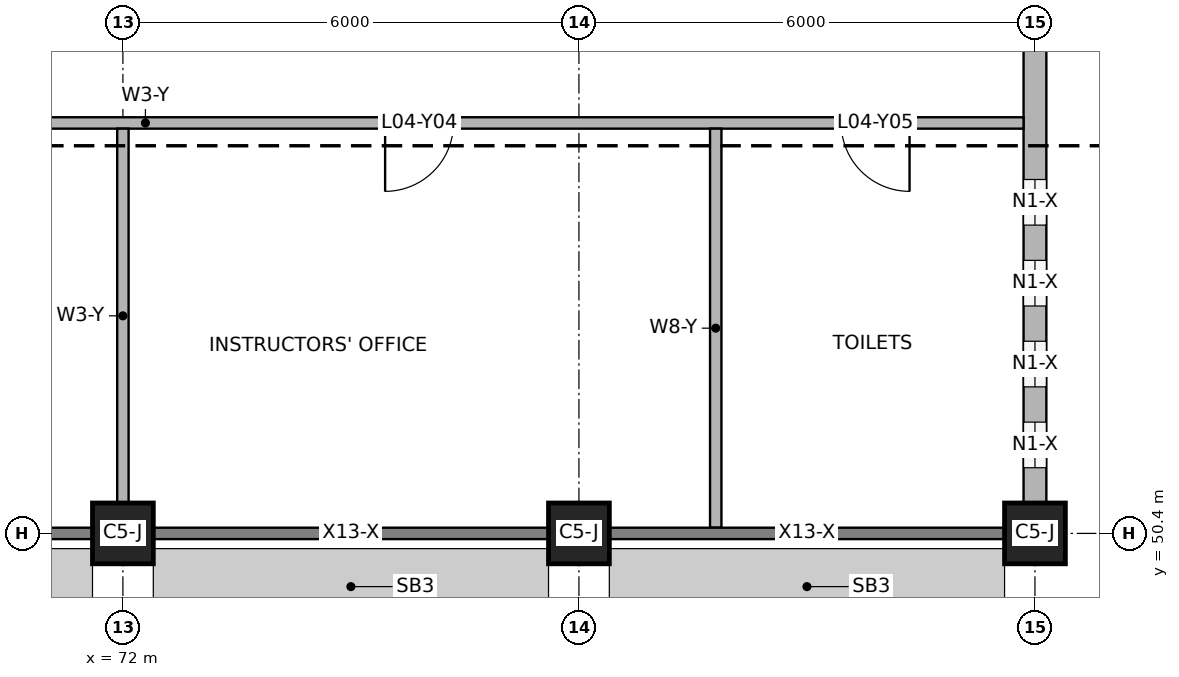
"""IFC4 building model, lengths in metres.
Left out: names, types, materials, properties, quantities, classifications, styles, units other than length and angle.
Written with IfcOpenShell. Run it as: python <this file> out.ifc"""

import sys

from ifc_helpers import new_model, si_unit, direction, frame, frame_2d, origin, origin_2d, place, context, subcontext, project, spatial, rectangle, extrude, element, fill, save


model = new_model("IFC4")
c1 = context("Model", 3, precision=1e-05, world=origin(), true_north=direction((0.0, 1.0)))
c2 = subcontext(c1, "Body", "Model", "MODEL_VIEW")
j1 = project(units=[si_unit("LENGTHUNIT", "METRE"), si_unit("PLANEANGLEUNIT", "RADIAN")], contexts=[c1])
p1 = place(None, origin())
s1 = spatial("IfcSite", under=j1, at=p1, CompositionType="ELEMENT")
p2 = place(p1, origin())
s2 = spatial("IfcBuilding", under=s1, at=p2, CompositionType="ELEMENT")
p3 = place(p2, frame((0.0, 0.0, 16.8)))
s3 = spatial("IfcBuildingStorey", under=s2, at=p3, CompositionType="ELEMENT", Elevation=16.8)
for number, where, z_axis, x_axis in (
    (1, (72.0, 50.4, 0.0), (0.0, 0.0, 1.0), (1.0, 0.0, 0.0)),
    (2, (78.0, 50.4, 0.0), (0.0, 0.0, 1.0), (1.0, 0.0, 0.0)),
    (3, (84.0, 50.4, 0.0), (0.0, 0.0, 1.0), (1.0, 0.0, 0.0)),
):
    element("IfcColumn", number, at=place(p3, frame(where, z_axis=z_axis, x_axis=x_axis)), inside=s3, PredefinedType="COLUMN", context=c2, shape_type="SweptSolid", body=[
        extrude(rectangle(XDim=0.8, YDim=0.8, at=origin_2d()), origin(), (0.0, 0.0, 1.0), 4.0),
    ])
p4 = place(p3, frame((84.0, 50.8, 0.0), z_axis=(0.0, 0.0, 1.0), x_axis=(0.0, 1.0, 0.0)))
e4 = element("IfcWall", 4, at=p4, inside=s3, PredefinedType="SOLIDWALL", context=c2, shape_type="SweptSolid", body=[
    extrude(rectangle(XDim=6.4, YDim=0.3, at=frame_2d((3.2, 0.0))), origin(), (0.0, 0.0, 1.0), 3.1),
])
p5 = place(p4, frame((0.464, 0.0, 0.9)))
e5 = element("IfcOpeningElement", 5, at=p5, cuts=e4, PredefinedType="OPENING", context=c2, shape_type="SweptSolid", body=[
    extrude(rectangle(XDim=0.6, YDim=1.9, at=frame_2d((0.3, 0.95))), frame((0.0, 0.16, 0.0), z_axis=(0.0, -1.0, 0.0), x_axis=(1.0, 0.0, 0.0)), (0.0, 0.0, 1.0), 0.32),
])
p6 = place(p4, frame((1.528, 0.0, 0.9)))
e6 = element("IfcOpeningElement", 6, at=p6, cuts=e4, PredefinedType="OPENING", context=c2, shape_type="SweptSolid", body=[
    extrude(rectangle(XDim=0.6, YDim=1.9, at=frame_2d((0.3, 0.95))), frame((0.0, 0.16, 0.0), z_axis=(0.0, -1.0, 0.0), x_axis=(1.0, 0.0, 0.0)), (0.0, 0.0, 1.0), 0.32),
])
p7 = place(p4, frame((2.592, 0.0, 0.9)))
e7 = element("IfcOpeningElement", 7, at=p7, cuts=e4, PredefinedType="OPENING", context=c2, shape_type="SweptSolid", body=[
    extrude(rectangle(XDim=0.6, YDim=1.9, at=frame_2d((0.3, 0.95))), frame((0.0, 0.16, 0.0), z_axis=(0.0, -1.0, 0.0), x_axis=(1.0, 0.0, 0.0)), (0.0, 0.0, 1.0), 0.32),
])
p8 = place(p4, frame((3.656, 0.0, 0.9)))
e8 = element("IfcOpeningElement", 8, at=p8, cuts=e4, PredefinedType="OPENING", context=c2, shape_type="SweptSolid", body=[
    extrude(rectangle(XDim=0.6, YDim=1.9, at=frame_2d((0.3, 0.95))), frame((0.0, 0.16, 0.0), z_axis=(0.0, -1.0, 0.0), x_axis=(1.0, 0.0, 0.0)), (0.0, 0.0, 1.0), 0.32),
])
p9 = place(p3, frame((72.0, 50.8, 0.0), z_axis=(0.0, 0.0, 1.0), x_axis=(0.0, 1.0, 0.0)))
e9 = element("IfcWall", 9, at=p9, inside=s3, PredefinedType="PARTITIONING", context=c2, shape_type="SweptSolid", body=[
    extrude(rectangle(XDim=4.925, YDim=0.15, at=frame_2d((2.462, 0.0))), origin(), (0.0, 0.0, 1.0), 3.1),
])
p10 = place(p3, frame((79.8, 50.475, 0.0), z_axis=(0.0, 0.0, 1.0), x_axis=(0.0, 1.0, 0.0)))
e10 = element("IfcWall", 10, at=p10, inside=s3, PredefinedType="PARTITIONING", context=c2, shape_type="SweptSolid", body=[
    extrude(rectangle(XDim=5.25, YDim=0.15, at=frame_2d((2.625, 0.0))), origin(), (0.0, 0.0, 1.0), 3.2),
])
p11 = place(p3, frame((66.075, 55.8, 0.0), z_axis=(0.0, 0.0, 1.0), x_axis=(1.0, 0.0, 0.0)))
e11 = element("IfcWall", 11, at=p11, inside=s3, PredefinedType="PARTITIONING", context=c2, shape_type="SweptSolid", body=[
    extrude(rectangle(XDim=17.775, YDim=0.15, at=frame_2d((8.888, 0.0))), origin(), (0.0, 0.0, 1.0), 3.1),
])
p12 = place(p11, frame((9.375, 0.0, 0.0)))
e12 = element("IfcOpeningElement", 12, at=p12, cuts=e11, PredefinedType="OPENING", context=c2, shape_type="SweptSolid", body=[
    extrude(rectangle(XDim=0.9, YDim=2.1, at=frame_2d((0.45, 1.05))), frame((0.0, 0.085, 0.0), z_axis=(0.0, -1.0, 0.0), x_axis=(1.0, 0.0, 0.0)), (0.0, 0.0, 1.0), 0.17),
])
p13 = place(p11, frame((15.375, 0.0, 0.0)))
e13 = element("IfcOpeningElement", 13, at=p13, cuts=e11, PredefinedType="OPENING", context=c2, shape_type="SweptSolid", body=[
    extrude(rectangle(XDim=0.9, YDim=2.1, at=frame_2d((0.45, 1.05))), frame((0.0, 0.085, 0.0), z_axis=(0.0, -1.0, 0.0), x_axis=(1.0, 0.0, 0.0)), (0.0, 0.0, 1.0), 0.17),
])
p14 = place(p5, origin())
e14 = element("IfcWindow", 14, at=p14, inside=s3, PartitioningType="SINGLE_PANEL", PredefinedType="WINDOW", context=c2, shape_type="SweptSolid", body=[
    extrude(rectangle(XDim=0.6, YDim=1.9, at=frame_2d((0.3, 0.95))), frame((0.0, 0.03, 0.0), z_axis=(0.0, -1.0, 0.0), x_axis=(1.0, 0.0, 0.0)), (0.0, 0.0, 1.0), 0.06),
])
fill(e5, e14)
p15 = place(p6, origin())
e15 = element("IfcWindow", 15, at=p15, inside=s3, PartitioningType="SINGLE_PANEL", PredefinedType="WINDOW", context=c2, shape_type="SweptSolid", body=[
    extrude(rectangle(XDim=0.6, YDim=1.9, at=frame_2d((0.3, 0.95))), frame((0.0, 0.03, 0.0), z_axis=(0.0, -1.0, 0.0), x_axis=(1.0, 0.0, 0.0)), (0.0, 0.0, 1.0), 0.06),
])
fill(e6, e15)
p16 = place(p7, origin())
e16 = element("IfcWindow", 16, at=p16, inside=s3, PartitioningType="SINGLE_PANEL", PredefinedType="WINDOW", context=c2, shape_type="SweptSolid", body=[
    extrude(rectangle(XDim=0.6, YDim=1.9, at=frame_2d((0.3, 0.95))), frame((0.0, 0.03, 0.0), z_axis=(0.0, -1.0, 0.0), x_axis=(1.0, 0.0, 0.0)), (0.0, 0.0, 1.0), 0.06),
])
fill(e7, e16)
p17 = place(p8, origin())
e17 = element("IfcWindow", 17, at=p17, inside=s3, PartitioningType="SINGLE_PANEL", PredefinedType="WINDOW", context=c2, shape_type="SweptSolid", body=[
    extrude(rectangle(XDim=0.6, YDim=1.9, at=frame_2d((0.3, 0.95))), frame((0.0, 0.03, 0.0), z_axis=(0.0, -1.0, 0.0), x_axis=(1.0, 0.0, 0.0)), (0.0, 0.0, 1.0), 0.06),
])
fill(e8, e17)
p18 = place(p12, frame((0.9, 0.0, 0.0), z_axis=(0.0, 0.0, 1.0), x_axis=(-1.0, 0.0, 0.0)))
e18 = element("IfcDoor", 18, at=p18, inside=s3, OperationType="SINGLE_SWING_RIGHT", PredefinedType="DOOR", context=c2, shape_type="SweptSolid", body=[
    extrude(rectangle(XDim=0.9, YDim=2.1, at=frame_2d((0.45, 1.05))), frame((0.0, 0.025, 0.0), z_axis=(0.0, -1.0, 0.0), x_axis=(1.0, 0.0, 0.0)), (0.0, 0.0, 1.0), 0.05),
])
fill(e12, e18)
p19 = place(p13, frame((0.9, 0.0, 0.0), z_axis=(0.0, 0.0, 1.0), x_axis=(-1.0, 0.0, 0.0)))
e19 = element("IfcDoor", 19, at=p19, inside=s3, OperationType="SINGLE_SWING_LEFT", PredefinedType="DOOR", context=c2, shape_type="SweptSolid", body=[
    extrude(rectangle(XDim=0.9, YDim=2.1, at=frame_2d((0.45, 1.05))), frame((0.0, 0.025, 0.0), z_axis=(0.0, -1.0, 0.0), x_axis=(1.0, 0.0, 0.0)), (0.0, 0.0, 1.0), 0.05),
])
fill(e13, e19)
save(model, sys.argv[1])
